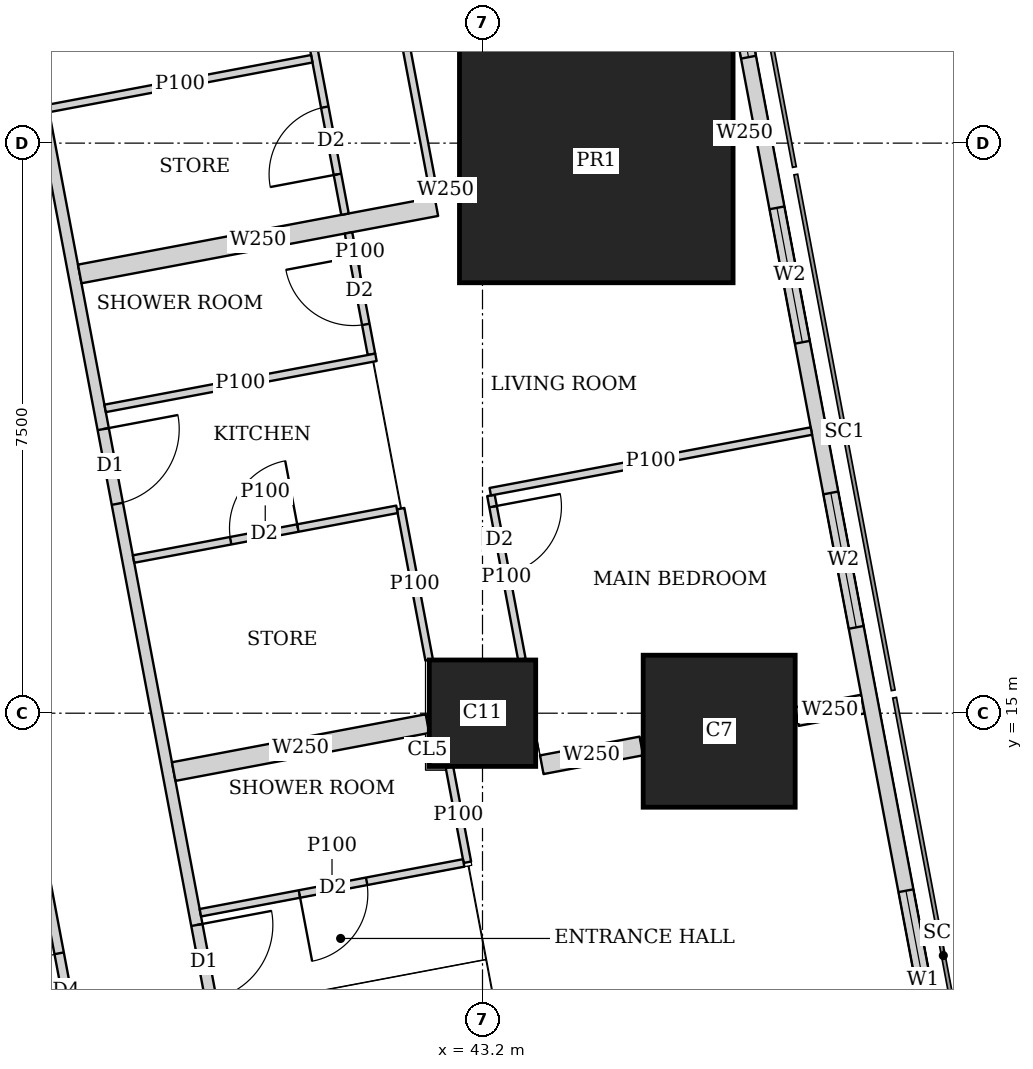
"""IFC4 building model, lengths in metres.
Left out: names, types, materials, properties, quantities, classifications, styles, units other than length and angle.
Written with IfcOpenShell. Run it as: python <this file> out.ifc"""

import sys

from ifc_helpers import new_model, si_unit, direction, frame, frame_2d, origin, origin_2d, place, context, subcontext, project, spatial, rectangle, extrude, element, fill, save


model = new_model("IFC4")
c1 = context("Model", 3, precision=1e-05, world=origin(), true_north=direction((0.0, 1.0)))
c2 = subcontext(c1, "Body", "Model", "MODEL_VIEW")
j1 = project(units=[si_unit("LENGTHUNIT", "METRE"), si_unit("PLANEANGLEUNIT", "RADIAN")], contexts=[c1])
p1 = place(None, origin())
s1 = spatial("IfcSite", under=j1, at=p1, CompositionType="ELEMENT")
p2 = place(p1, origin())
s2 = spatial("IfcBuilding", under=s1, at=p2, CompositionType="ELEMENT")
p3 = place(p2, frame((0.0, 0.0, 255.35)))
s3 = spatial("IfcBuildingStorey", under=s2, at=p3, CompositionType="ELEMENT", Elevation=255.35)
p4 = place(p3, frame((43.2, 15.0, 0.0), z_axis=(0.0, 0.0, 1.0), x_axis=(1.0, 0.0, 0.0)))
e1 = element("IfcColumn", 1, at=p4, inside=s3, PredefinedType="COLUMN", context=c2, shape_type="SweptSolid", body=[
    extrude(rectangle(XDim=1.4, YDim=1.4, at=origin_2d()), origin(), (0.0, 0.0, 1.0), 3.75),
])
p5 = place(p3, frame((46.314, 14.763, 0.0), z_axis=(0.0, 0.0, 1.0), x_axis=(1.0, 0.0, 0.0)))
e2 = element("IfcColumn", 2, at=p5, inside=s3, PredefinedType="COLUMN", context=c2, shape_type="SweptSolid", body=[
    extrude(rectangle(XDim=2.0, YDim=2.0, at=origin_2d()), origin(), (0.0, 0.0, 1.0), 3.75),
])
p6 = place(p3, frame((44.697, 22.263, 0.0), z_axis=(0.0, 0.0, 1.0), x_axis=(1.0, 0.0, 0.0)))
e3 = element("IfcColumn", 3, at=p6, inside=s3, PredefinedType="COLUMN", context=c2, shape_type="SweptSolid", body=[
    extrude(rectangle(XDim=3.6, YDim=3.2, at=origin_2d()), origin(), (0.0, 0.0, 1.0), 3.75),
])
p7 = place(p3, frame((49.684, 7.832, 0.0), z_axis=(0.0, 0.0, 1.0), x_axis=(-0.185616669694, 0.982622232565, 0.0)))
e4 = element("IfcWall", 4, at=p7, inside=s3, PredefinedType="SOLIDWALL", context=c2, shape_type="SweptSolid", body=[
    extrude(rectangle(XDim=36.0, YDim=0.2, at=frame_2d((18.0, 0.0))), origin(), (0.0, 0.0, 1.0), 3.5),
])
p8 = place(p7, frame((2.518, 0.0, 0.9)))
e5 = element("IfcOpeningElement", 5, at=p8, cuts=e4, PredefinedType="OPENING", context=c2, shape_type="SweptSolid", body=[
    extrude(rectangle(XDim=2.4, YDim=1.5, at=frame_2d((1.2, 0.75))), frame((0.0, 0.11, 0.0), z_axis=(0.0, -1.0, 0.0), x_axis=(1.0, 0.0, 0.0)), (0.0, 0.0, 1.0), 0.22),
])
p9 = place(p7, frame((8.444, 0.0, 0.9)))
e6 = element("IfcOpeningElement", 6, at=p9, cuts=e4, PredefinedType="OPENING", context=c2, shape_type="SweptSolid", body=[
    extrude(rectangle(XDim=1.8, YDim=1.5, at=frame_2d((0.9, 0.75))), frame((0.0, 0.11, 0.0), z_axis=(0.0, -1.0, 0.0), x_axis=(1.0, 0.0, 0.0)), (0.0, 0.0, 1.0), 0.22),
])
p10 = place(p7, frame((12.261, 0.0, 0.9)))
e7 = element("IfcOpeningElement", 7, at=p10, cuts=e4, PredefinedType="OPENING", context=c2, shape_type="SweptSolid", body=[
    extrude(rectangle(XDim=1.8, YDim=1.5, at=frame_2d((0.9, 0.75))), frame((0.0, 0.11, 0.0), z_axis=(0.0, -1.0, 0.0), x_axis=(1.0, 0.0, 0.0)), (0.0, 0.0, 1.0), 0.22),
])
p11 = place(p7, frame((16.078, 0.0, 0.9)))
e8 = element("IfcOpeningElement", 8, at=p11, cuts=e4, PredefinedType="OPENING", context=c2, shape_type="SweptSolid", body=[
    extrude(rectangle(XDim=1.8, YDim=1.5, at=frame_2d((0.9, 0.75))), frame((0.0, 0.11, 0.0), z_axis=(0.0, -1.0, 0.0), x_axis=(1.0, 0.0, 0.0)), (0.0, 0.0, 1.0), 0.22),
])
p12 = place(p7, frame((19.894, 0.0, 0.9)))
e9 = element("IfcOpeningElement", 9, at=p12, cuts=e4, PredefinedType="OPENING", context=c2, shape_type="SweptSolid", body=[
    extrude(rectangle(XDim=1.8, YDim=1.5, at=frame_2d((0.9, 0.75))), frame((0.0, 0.11, 0.0), z_axis=(0.0, -1.0, 0.0), x_axis=(1.0, 0.0, 0.0)), (0.0, 0.0, 1.0), 0.22),
])
p13 = place(p7, frame((23.71, 0.0, 0.9)))
e10 = element("IfcOpeningElement", 10, at=p13, cuts=e4, PredefinedType="OPENING", context=c2, shape_type="SweptSolid", body=[
    extrude(rectangle(XDim=1.8, YDim=1.5, at=frame_2d((0.9, 0.75))), frame((0.0, 0.11, 0.0), z_axis=(0.0, -1.0, 0.0), x_axis=(1.0, 0.0, 0.0)), (0.0, 0.0, 1.0), 0.22),
])
p14 = place(p7, frame((27.526, 0.0, 0.9)))
e11 = element("IfcOpeningElement", 11, at=p14, cuts=e4, PredefinedType="OPENING", context=c2, shape_type="SweptSolid", body=[
    extrude(rectangle(XDim=1.8, YDim=1.5, at=frame_2d((0.9, 0.75))), frame((0.0, 0.11, 0.0), z_axis=(0.0, -1.0, 0.0), x_axis=(1.0, 0.0, 0.0)), (0.0, 0.0, 1.0), 0.22),
])
p15 = place(p7, frame((32.046, 0.0, 0.9)))
e12 = element("IfcOpeningElement", 12, at=p15, cuts=e4, PredefinedType="OPENING", context=c2, shape_type="SweptSolid", body=[
    extrude(rectangle(XDim=1.8, YDim=1.5, at=frame_2d((0.9, 0.75))), frame((0.0, 0.11, 0.0), z_axis=(0.0, -1.0, 0.0), x_axis=(1.0, 0.0, 0.0)), (0.0, 0.0, 1.0), 0.22),
])
p16 = place(p3, frame((33.781, 42.186, 0.0), z_axis=(0.0, 0.0, 1.0), x_axis=(0.185593518645, -0.9826266055, 0.0)))
e13 = element("IfcWall", 13, at=p16, inside=s3, PredefinedType="SOLIDWALL", context=c2, shape_type="SweptSolid", body=[
    extrude(rectangle(XDim=35.961, YDim=0.15, at=frame_2d((17.98, 0.0))), origin(), (0.0, 0.0, 1.0), 2.5),
])
p17 = place(p16, frame((7.183, 0.0, 0.0)))
e14 = element("IfcOpeningElement", 14, at=p17, cuts=e13, PredefinedType="OPENING", context=c2, shape_type="SweptSolid", body=[
    extrude(rectangle(XDim=1.0, YDim=2.1, at=frame_2d((0.5, 1.05))), frame((0.0, 0.085, 0.0), z_axis=(0.0, -1.0, 0.0), x_axis=(1.0, 0.0, 0.0)), (0.0, 0.0, 1.0), 0.17),
])
p18 = place(p16, frame((11.76, 0.0, 0.0)))
e15 = element("IfcOpeningElement", 15, at=p18, cuts=e13, PredefinedType="OPENING", context=c2, shape_type="SweptSolid", body=[
    extrude(rectangle(XDim=1.0, YDim=2.1, at=frame_2d((0.5, 1.05))), frame((0.0, 0.085, 0.0), z_axis=(0.0, -1.0, 0.0), x_axis=(1.0, 0.0, 0.0)), (0.0, 0.0, 1.0), 0.17),
])
p19 = place(p16, frame((23.863, 0.0, 0.0)))
e16 = element("IfcOpeningElement", 16, at=p19, cuts=e13, PredefinedType="OPENING", context=c2, shape_type="SweptSolid", body=[
    extrude(rectangle(XDim=1.0, YDim=2.1, at=frame_2d((0.5, 1.05))), frame((0.0, 0.085, 0.0), z_axis=(0.0, -1.0, 0.0), x_axis=(1.0, 0.0, 0.0)), (0.0, 0.0, 1.0), 0.17),
])
p20 = place(p16, frame((30.502, 0.0, 0.0)))
e17 = element("IfcOpeningElement", 17, at=p20, cuts=e13, PredefinedType="OPENING", context=c2, shape_type="SweptSolid", body=[
    extrude(rectangle(XDim=1.0, YDim=2.1, at=frame_2d((0.5, 1.05))), frame((0.0, 0.085, 0.0), z_axis=(0.0, -1.0, 0.0), x_axis=(1.0, 0.0, 0.0)), (0.0, 0.0, 1.0), 0.17),
])
p21 = place(p3, frame((41.157, 29.273, 0.0), z_axis=(0.0, 0.0, 1.0), x_axis=(0.18542464283, -0.982658486877, 0.0)))
e18 = element("IfcWall", 18, at=p21, inside=s3, PredefinedType="PARTITIONING", context=c2, shape_type="SweptSolid", body=[
    extrude(rectangle(XDim=7.421, YDim=0.1, at=frame_2d((3.71, 0.0))), origin(), (0.0, 0.0, 1.0), 2.5),
])
p22 = place(p21, frame((0.8, 0.0, 0.0)))
e19 = element("IfcOpeningElement", 19, at=p22, cuts=e18, PredefinedType="OPENING", context=c2, shape_type="SweptSolid", body=[
    extrude(rectangle(XDim=0.9, YDim=2.1, at=frame_2d((0.45, 1.05))), frame((0.0, 0.06, 0.0), z_axis=(0.0, -1.0, 0.0), x_axis=(1.0, 0.0, 0.0)), (0.0, 0.0, 1.0), 0.12),
])
p23 = place(p21, frame((4.126, 0.0, 0.0)))
e20 = element("IfcOpeningElement", 20, at=p23, cuts=e18, PredefinedType="OPENING", context=c2, shape_type="SweptSolid", body=[
    extrude(rectangle(XDim=0.9, YDim=2.1, at=frame_2d((0.45, 1.05))), frame((0.0, 0.06, 0.0), z_axis=(0.0, -1.0, 0.0), x_axis=(1.0, 0.0, 0.0)), (0.0, 0.0, 1.0), 0.12),
])
p24 = place(p3, frame((39.997, 28.942, 0.0), z_axis=(0.0, 0.0, 1.0), x_axis=(0.185686318797, -0.982609073341, 0.0)))
e21 = element("IfcWall", 21, at=p24, inside=s3, PredefinedType="PARTITIONING", context=c2, shape_type="SweptSolid", body=[
    extrude(rectangle(XDim=7.508, YDim=0.1, at=frame_2d((3.754, 0.0))), origin(), (0.0, 0.0, 1.0), 2.5),
])
p25 = place(p24, frame((0.576, 0.0, 0.0)))
e22 = element("IfcOpeningElement", 22, at=p25, cuts=e21, PredefinedType="OPENING", context=c2, shape_type="SweptSolid", body=[
    extrude(rectangle(XDim=0.9, YDim=2.1, at=frame_2d((0.45, 1.05))), frame((0.0, 0.06, 0.0), z_axis=(0.0, -1.0, 0.0), x_axis=(1.0, 0.0, 0.0)), (0.0, 0.0, 1.0), 0.12),
])
p26 = place(p24, frame((4.166, 0.0, 0.0)))
e23 = element("IfcOpeningElement", 23, at=p26, cuts=e21, PredefinedType="OPENING", context=c2, shape_type="SweptSolid", body=[
    extrude(rectangle(XDim=0.9, YDim=2.1, at=frame_2d((0.45, 1.05))), frame((0.0, 0.06, 0.0), z_axis=(0.0, -1.0, 0.0), x_axis=(1.0, 0.0, 0.0)), (0.0, 0.0, 1.0), 0.12),
])
p27 = place(p24, frame((2.483, 0.0, 0.0)))
e24 = element("IfcOpeningElement", 24, at=p27, cuts=e21, PredefinedType="OPENING", context=c2, shape_type="SweptSolid", body=[
    extrude(rectangle(XDim=0.9, YDim=2.1, at=frame_2d((0.45, 1.05))), frame((0.0, 0.06, 0.0), z_axis=(0.0, -1.0, 0.0), x_axis=(1.0, 0.0, 0.0)), (0.0, 0.0, 1.0), 0.12),
])
p28 = place(p24, frame((6.074, 0.0, 0.0)))
e25 = element("IfcOpeningElement", 25, at=p28, cuts=e21, PredefinedType="OPENING", context=c2, shape_type="SweptSolid", body=[
    extrude(rectangle(XDim=0.9, YDim=2.1, at=frame_2d((0.45, 1.05))), frame((0.0, 0.06, 0.0), z_axis=(0.0, -1.0, 0.0), x_axis=(1.0, 0.0, 0.0)), (0.0, 0.0, 1.0), 0.12),
])
p29 = place(p3, frame((40.954, 23.61, 0.0), z_axis=(0.0, 0.0, 1.0), x_axis=(-0.98264808502, -0.18547975902, 0.0)))
e26 = element("IfcWall", 26, at=p29, inside=s3, PredefinedType="PARTITIONING", context=c2, shape_type="SweptSolid", body=[
    extrude(rectangle(XDim=3.526, YDim=0.1, at=frame_2d((1.763, 0.0))), origin(), (0.0, 0.0, 1.0), 2.5),
])
p30 = place(p3, frame((41.437, 21.319, 0.0), z_axis=(0.0, 0.0, 1.0), x_axis=(0.185793689589, -0.982588777113, 0.0)))
e27 = element("IfcWall", 27, at=p30, inside=s3, PredefinedType="PARTITIONING", context=c2, shape_type="SweptSolid", body=[
    extrude(rectangle(XDim=1.625, YDim=0.1, at=frame_2d((0.813, 0.0))), origin(), (0.0, 0.0, 1.0), 3.5),
])
p31 = place(p30, frame((0.325, 0.0, 0.0)))
e28 = element("IfcOpeningElement", 28, at=p31, cuts=e27, PredefinedType="OPENING", context=c2, shape_type="SweptSolid", body=[
    extrude(rectangle(XDim=0.9, YDim=2.1, at=frame_2d((0.45, 1.05))), frame((0.0, 0.06, 0.0), z_axis=(0.0, -1.0, 0.0), x_axis=(1.0, 0.0, 0.0)), (0.0, 0.0, 1.0), 0.12),
])
p32 = place(p3, frame((41.798, 19.682, 0.0), z_axis=(0.0, 0.0, 1.0), x_axis=(-0.982681091817, -0.185304807776, 0.0)))
e29 = element("IfcWall", 29, at=p32, inside=s3, PredefinedType="PARTITIONING", context=c2, shape_type="SweptSolid", body=[
    extrude(rectangle(XDim=3.626, YDim=0.1, at=frame_2d((1.813, 0.0))), origin(), (0.0, 0.0, 1.0), 3.5),
])
p33 = place(p3, frame((43.311, 17.865, 0.0), z_axis=(0.0, 0.0, 1.0), x_axis=(0.185572140257, -0.982630643101, 0.0)))
e30 = element("IfcWall", 30, at=p33, inside=s3, PredefinedType="PARTITIONING", context=c2, shape_type="SweptSolid", body=[
    extrude(rectangle(XDim=2.193, YDim=0.1, at=frame_2d((1.097, 0.0))), origin(), (0.0, 0.0, 1.0), 3.5),
])
p34 = place(p33, frame((0.15, 0.0, 0.0)))
e31 = element("IfcOpeningElement", 31, at=p34, cuts=e30, PredefinedType="OPENING", context=c2, shape_type="SweptSolid", body=[
    extrude(rectangle(XDim=0.9, YDim=2.1, at=frame_2d((0.45, 1.05))), frame((0.0, 0.06, 0.0), z_axis=(0.0, -1.0, 0.0), x_axis=(1.0, 0.0, 0.0)), (0.0, 0.0, 1.0), 0.12),
])
p35 = place(p3, frame((42.123, 17.691, 0.0), z_axis=(0.0, 0.0, 1.0), x_axis=(0.185183804812, -0.98270390171, 0.0)))
e32 = element("IfcWall", 32, at=p35, inside=s3, PredefinedType="PARTITIONING", context=c2, shape_type="SweptSolid", body=[
    extrude(rectangle(XDim=2.025, YDim=0.1, at=frame_2d((1.012, 0.0))), origin(), (0.0, 0.0, 1.0), 3.5),
])
p36 = place(p3, frame((47.527, 18.712, 0.0), z_axis=(0.0, 0.0, 1.0), x_axis=(-0.982633535512, -0.185556823879, 0.0)))
e33 = element("IfcWall", 33, at=p36, inside=s3, PredefinedType="PARTITIONING", context=c2, shape_type="SweptSolid", body=[
    extrude(rectangle(XDim=4.3, YDim=0.1, at=frame_2d((2.15, 0.0))), origin(), (0.0, 0.0, 1.0), 2.5),
])
p37 = place(p3, frame((42.074, 17.682, 0.0), z_axis=(0.0, 0.0, 1.0), x_axis=(-0.982660701716, -0.185412904897, 0.0)))
e34 = element("IfcWall", 34, at=p37, inside=s3, PredefinedType="PARTITIONING", context=c2, shape_type="SweptSolid", body=[
    extrude(rectangle(XDim=3.526, YDim=0.1, at=frame_2d((1.763, 0.0))), origin(), (0.0, 0.0, 1.0), 3.5),
])
p38 = place(p37, frame((1.326, 0.0, 0.0)))
e35 = element("IfcOpeningElement", 35, at=p38, cuts=e34, PredefinedType="OPENING", context=c2, shape_type="SweptSolid", body=[
    extrude(rectangle(XDim=0.9, YDim=2.1, at=frame_2d((0.45, 1.05))), frame((0.0, 0.06, 0.0), z_axis=(0.0, -1.0, 0.0), x_axis=(1.0, 0.0, 0.0)), (0.0, 0.0, 1.0), 0.12),
])
p39 = place(p3, frame((46.782, 22.657, 0.0), z_axis=(0.0, 0.0, 1.0), x_axis=(-0.982104607121, -0.188336243648, 0.0)))
e36 = element("IfcWall", 36, at=p39, inside=s3, PredefinedType="SOLIDWALL", context=c2, shape_type="SweptSolid", body=[
    extrude(rectangle(XDim=0.266, YDim=0.25, at=frame_2d((0.133, 0.0))), origin(), (0.0, 0.0, 1.0), 3.5),
])
p40 = place(p3, frame((42.873, 21.918, 0.0), z_axis=(0.0, 0.0, 1.0), x_axis=(-0.982431406936, -0.186624035603, 0.0)))
e37 = element("IfcWall", 37, at=p40, inside=s3, PredefinedType="SOLIDWALL", context=c2, shape_type="SweptSolid", body=[
    extrude(rectangle(XDim=0.322, YDim=0.25, at=frame_2d((0.161, 0.0))), origin(), (0.0, 0.0, 1.0), 2.5),
])
p41 = place(p3, frame((42.593, 21.665, 0.0), z_axis=(0.0, 0.0, 1.0), x_axis=(-0.982635807605, -0.185544791394, 0.0)))
e38 = element("IfcWall", 38, at=p41, inside=s3, PredefinedType="SOLIDWALL", context=c2, shape_type="SweptSolid", body=[
    extrude(rectangle(XDim=4.775, YDim=0.25, at=frame_2d((2.388, 0.0))), origin(), (0.0, 0.0, 1.0), 2.5),
])
p42 = place(p3, frame((42.765, 14.29, 0.0), z_axis=(0.0, 0.0, 1.0), x_axis=(0.185446293138, -0.982654401283, 0.0)))
e39 = element("IfcWall", 39, at=p42, inside=s3, PredefinedType="PARTITIONING", context=c2, shape_type="SweptSolid", body=[
    extrude(rectangle(XDim=1.273, YDim=0.1, at=frame_2d((0.636, 0.0))), origin(), (0.0, 0.0, 1.0), 3.5),
])
p43 = place(p3, frame((42.952, 13.03, 0.0), z_axis=(0.0, 0.0, 1.0), x_axis=(-0.982585626838, -0.185810349366, 0.0)))
e40 = element("IfcWall", 40, at=p43, inside=s3, PredefinedType="PARTITIONING", context=c2, shape_type="SweptSolid", body=[
    extrude(rectangle(XDim=3.525, YDim=0.1, at=frame_2d((1.763, 0.0))), origin(), (0.0, 0.0, 1.0), 3.5),
])
p44 = place(p43, frame((1.299, 0.0, 0.0)))
e41 = element("IfcOpeningElement", 41, at=p44, cuts=e40, PredefinedType="OPENING", context=c2, shape_type="SweptSolid", body=[
    extrude(rectangle(XDim=0.9, YDim=2.1, at=frame_2d((0.45, 1.05))), frame((0.0, 0.06, 0.0), z_axis=(0.0, -1.0, 0.0), x_axis=(1.0, 0.0, 0.0)), (0.0, 0.0, 1.0), 0.12),
])
p45 = place(p3, frame((48.206, 15.12, 0.0), z_axis=(0.0, 0.0, 1.0), x_axis=(-0.982608419258, -0.185689780017, 0.0)))
e42 = element("IfcWall", 42, at=p45, inside=s3, PredefinedType="SOLIDWALL", context=c2, shape_type="SweptSolid", body=[
    extrude(rectangle(XDim=0.884, YDim=0.25, at=frame_2d((0.442, 0.0))), origin(), (0.0, 0.0, 1.0), 3.5),
])
p46 = place(p3, frame((45.29, 14.569, 0.0), z_axis=(0.0, 0.0, 1.0), x_axis=(-0.982676759201, -0.185327782391, 0.0)))
e43 = element("IfcWall", 43, at=p46, inside=s3, PredefinedType="SOLIDWALL", context=c2, shape_type="SweptSolid", body=[
    extrude(rectangle(XDim=1.333, YDim=0.25, at=frame_2d((0.667, 0.0))), origin(), (0.0, 0.0, 1.0), 3.5),
])
p47 = place(p3, frame((42.476, 14.863, 0.0), z_axis=(0.0, 0.0, 1.0), x_axis=(-0.982603567712, -0.185715450942, 0.0)))
e44 = element("IfcWall", 44, at=p47, inside=s3, PredefinedType="SOLIDWALL", context=c2, shape_type="SweptSolid", body=[
    extrude(rectangle(XDim=3.398, YDim=0.25, at=frame_2d((1.699, 0.0))), origin(), (0.0, 0.0, 1.0), 3.5),
])
p48 = place(p3, frame((37.947, 10.163, 0.0), z_axis=(0.0, 0.0, 1.0), x_axis=(-0.185589250699, 0.982627411599, 0.0)))
e45 = element("IfcWall", 45, at=p48, inside=s3, PredefinedType="PARTITIONING", context=c2, shape_type="SweptSolid", body=[
    extrude(rectangle(XDim=12.555, YDim=0.125, at=frame_2d((6.277, 0.0))), origin(), (0.0, 0.0, 1.0), 2.5),
])
p49 = place(p48, frame((0.708, 0.0, 0.0)))
e46 = element("IfcOpeningElement", 46, at=p49, cuts=e45, PredefinedType="OPENING", context=c2, shape_type="SweptSolid", body=[
    extrude(rectangle(XDim=1.0, YDim=2.1, at=frame_2d((0.5, 1.05))), frame((0.0, 0.073, 0.0), z_axis=(0.0, -1.0, 0.0), x_axis=(1.0, 0.0, 0.0)), (0.0, 0.0, 1.0), 0.145),
])
p50 = place(p48, frame((5.9, 0.0, 0.0)))
e47 = element("IfcOpeningElement", 47, at=p50, cuts=e45, PredefinedType="OPENING", context=c2, shape_type="SweptSolid", body=[
    extrude(rectangle(XDim=1.0, YDim=2.1, at=frame_2d((0.5, 1.05))), frame((0.0, 0.073, 0.0), z_axis=(0.0, -1.0, 0.0), x_axis=(1.0, 0.0, 0.0)), (0.0, 0.0, 1.0), 0.145),
])
p51 = place(p48, frame((9.562, 0.0, 0.0)))
e48 = element("IfcOpeningElement", 48, at=p51, cuts=e45, PredefinedType="OPENING", context=c2, shape_type="SweptSolid", body=[
    extrude(rectangle(XDim=1.0, YDim=2.1, at=frame_2d((0.5, 1.05))), frame((0.0, 0.073, 0.0), z_axis=(0.0, -1.0, 0.0), x_axis=(1.0, 0.0, 0.0)), (0.0, 0.0, 1.0), 0.145),
])
p52 = place(p8, origin())
e49 = element("IfcWindow", 49, at=p52, inside=s3, PartitioningType="SINGLE_PANEL", PredefinedType="WINDOW", context=c2, shape_type="SweptSolid", body=[
    extrude(rectangle(XDim=2.4, YDim=1.5, at=frame_2d((1.2, 0.75))), frame((0.0, 0.03, 0.0), z_axis=(0.0, -1.0, 0.0), x_axis=(1.0, 0.0, 0.0)), (0.0, 0.0, 1.0), 0.06),
])
fill(e5, e49)
p53 = place(p9, origin())
e50 = element("IfcWindow", 50, at=p53, inside=s3, PartitioningType="SINGLE_PANEL", PredefinedType="WINDOW", context=c2, shape_type="SweptSolid", body=[
    extrude(rectangle(XDim=1.8, YDim=1.5, at=frame_2d((0.9, 0.75))), frame((0.0, 0.03, 0.0), z_axis=(0.0, -1.0, 0.0), x_axis=(1.0, 0.0, 0.0)), (0.0, 0.0, 1.0), 0.06),
])
fill(e6, e50)
p54 = place(p10, origin())
e51 = element("IfcWindow", 51, at=p54, inside=s3, PartitioningType="SINGLE_PANEL", PredefinedType="WINDOW", context=c2, shape_type="SweptSolid", body=[
    extrude(rectangle(XDim=1.8, YDim=1.5, at=frame_2d((0.9, 0.75))), frame((0.0, 0.03, 0.0), z_axis=(0.0, -1.0, 0.0), x_axis=(1.0, 0.0, 0.0)), (0.0, 0.0, 1.0), 0.06),
])
fill(e7, e51)
p55 = place(p11, origin())
e52 = element("IfcWindow", 52, at=p55, inside=s3, PartitioningType="SINGLE_PANEL", PredefinedType="WINDOW", context=c2, shape_type="SweptSolid", body=[
    extrude(rectangle(XDim=1.8, YDim=1.5, at=frame_2d((0.9, 0.75))), frame((0.0, 0.03, 0.0), z_axis=(0.0, -1.0, 0.0), x_axis=(1.0, 0.0, 0.0)), (0.0, 0.0, 1.0), 0.06),
])
fill(e8, e52)
p56 = place(p28, origin())
e53 = element("IfcDoor", 53, at=p56, inside=s3, OperationType="SINGLE_SWING_LEFT", PredefinedType="DOOR", context=c2, shape_type="SweptSolid", body=[
    extrude(rectangle(XDim=0.9, YDim=2.1, at=frame_2d((0.45, 1.05))), frame((0.0, 0.025, 0.0), z_axis=(0.0, -1.0, 0.0), x_axis=(1.0, 0.0, 0.0)), (0.0, 0.0, 1.0), 0.05),
])
fill(e25, e53)
p57 = place(p31, origin())
e54 = element("IfcDoor", 54, at=p57, inside=s3, OperationType="SINGLE_SWING_RIGHT", PredefinedType="DOOR", context=c2, shape_type="SweptSolid", body=[
    extrude(rectangle(XDim=0.9, YDim=2.1, at=frame_2d((0.45, 1.05))), frame((0.0, 0.025, 0.0), z_axis=(0.0, -1.0, 0.0), x_axis=(1.0, 0.0, 0.0)), (0.0, 0.0, 1.0), 0.05),
])
fill(e28, e54)
p58 = place(p34, origin())
e55 = element("IfcDoor", 55, at=p58, inside=s3, OperationType="SINGLE_SWING_LEFT", PredefinedType="DOOR", context=c2, shape_type="SweptSolid", body=[
    extrude(rectangle(XDim=0.9, YDim=2.1, at=frame_2d((0.45, 1.05))), frame((0.0, 0.025, 0.0), z_axis=(0.0, -1.0, 0.0), x_axis=(1.0, 0.0, 0.0)), (0.0, 0.0, 1.0), 0.05),
])
fill(e31, e55)
p59 = place(p19, origin())
e56 = element("IfcDoor", 56, at=p59, inside=s3, OperationType="SINGLE_SWING_LEFT", PredefinedType="DOOR", context=c2, shape_type="SweptSolid", body=[
    extrude(rectangle(XDim=1.0, YDim=2.1, at=frame_2d((0.5, 1.05))), frame((0.0, 0.025, 0.0), z_axis=(0.0, -1.0, 0.0), x_axis=(1.0, 0.0, 0.0)), (0.0, 0.0, 1.0), 0.05),
])
fill(e16, e56)
p60 = place(p44, origin())
e57 = element("IfcDoor", 57, at=p60, inside=s3, OperationType="SINGLE_SWING_RIGHT", PredefinedType="DOOR", context=c2, shape_type="SweptSolid", body=[
    extrude(rectangle(XDim=0.9, YDim=2.1, at=frame_2d((0.45, 1.05))), frame((0.0, 0.025, 0.0), z_axis=(0.0, -1.0, 0.0), x_axis=(1.0, 0.0, 0.0)), (0.0, 0.0, 1.0), 0.05),
])
fill(e41, e57)
p61 = place(p20, origin())
e58 = element("IfcDoor", 58, at=p61, inside=s3, OperationType="SINGLE_SWING_LEFT", PredefinedType="DOOR", context=c2, shape_type="SweptSolid", body=[
    extrude(rectangle(XDim=1.0, YDim=2.1, at=frame_2d((0.5, 1.05))), frame((0.0, 0.025, 0.0), z_axis=(0.0, -1.0, 0.0), x_axis=(1.0, 0.0, 0.0)), (0.0, 0.0, 1.0), 0.05),
])
fill(e17, e58)
p62 = place(p38, origin())
e59 = element("IfcDoor", 59, at=p62, inside=s3, OperationType="SINGLE_SWING_RIGHT", PredefinedType="DOOR", context=c2, shape_type="SweptSolid", body=[
    extrude(rectangle(XDim=0.9, YDim=2.1, at=frame_2d((0.45, 1.05))), frame((0.0, 0.025, 0.0), z_axis=(0.0, -1.0, 0.0), x_axis=(1.0, 0.0, 0.0)), (0.0, 0.0, 1.0), 0.05),
])
fill(e35, e59)
p63 = place(p49, origin())
e60 = element("IfcDoor", 60, at=p63, inside=s3, OperationType="SINGLE_SWING_LEFT", PredefinedType="DOOR", context=c2, shape_type="SweptSolid", body=[
    extrude(rectangle(XDim=1.0, YDim=2.1, at=frame_2d((0.5, 1.05))), frame((0.0, 0.025, 0.0), z_axis=(0.0, -1.0, 0.0), x_axis=(1.0, 0.0, 0.0)), (0.0, 0.0, 1.0), 0.05),
])
fill(e46, e60)
save(model, sys.argv[1])
